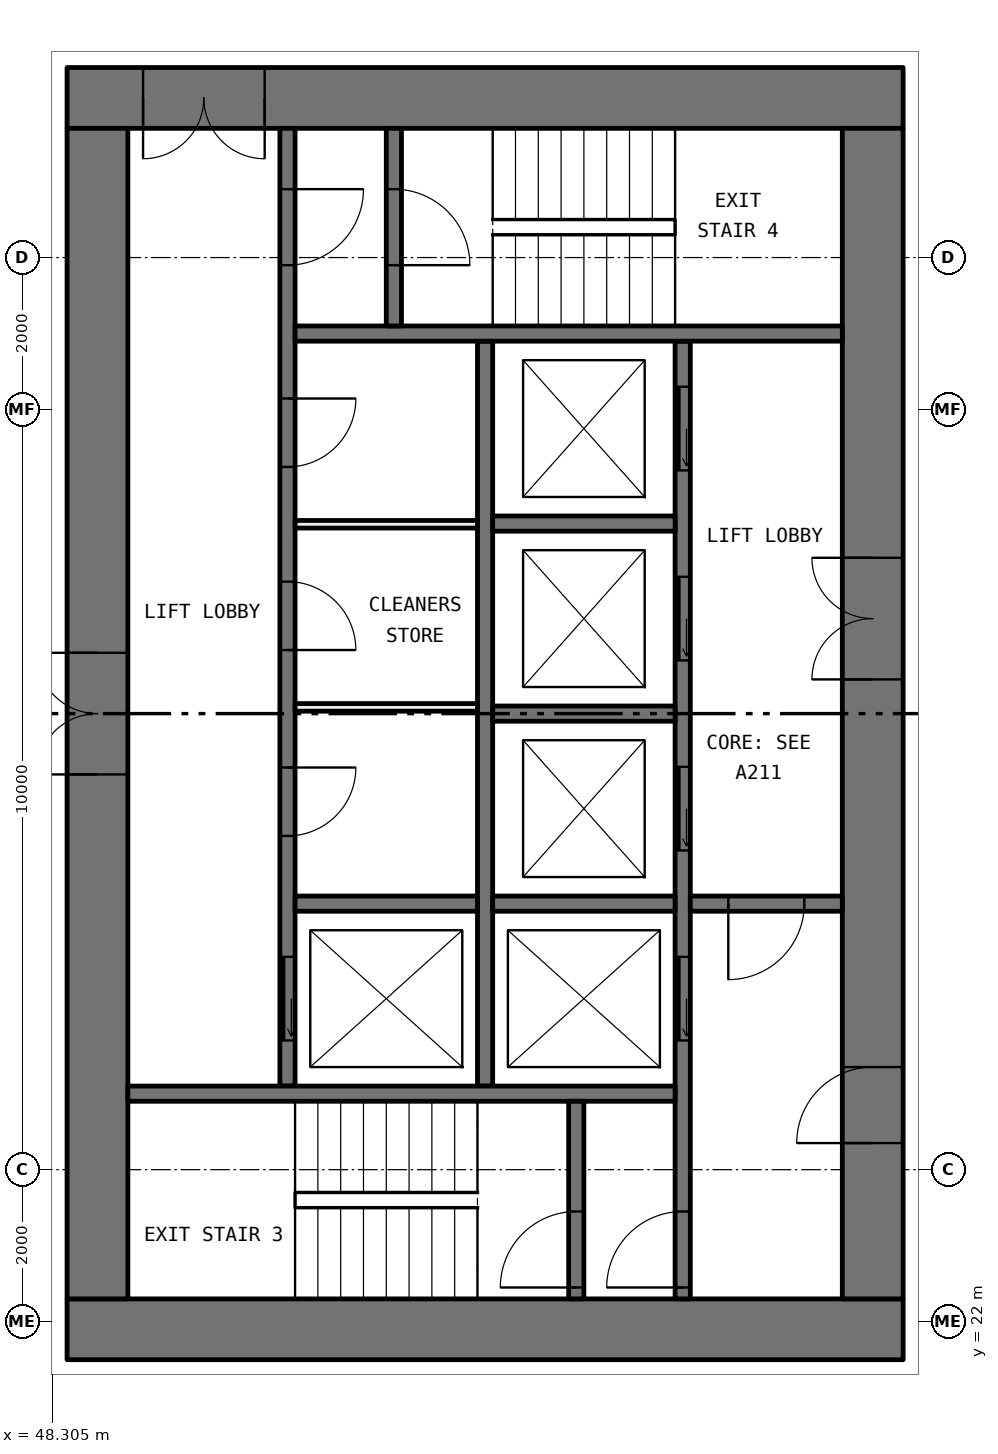
"""IFC4 building model, lengths in metres.
Left out: names, types, materials, properties, quantities, classifications, styles, units other than length and angle.
Written with IfcOpenShell. Run it as: python <this file> out.ifc"""

import sys

from ifc_helpers import new_model, si_unit, direction, frame, frame_2d, origin, place, context, subcontext, project, spatial, rectangle, extrude, element, fill, save


model = new_model("IFC4")
c1 = context("Model", 3, precision=1e-05, world=origin(), true_north=direction((0.0, 1.0)))
c2 = subcontext(c1, "Body", "Model", "MODEL_VIEW")
j1 = project(units=[si_unit("LENGTHUNIT", "METRE"), si_unit("PLANEANGLEUNIT", "RADIAN")], contexts=[c1])
p1 = place(None, origin())
s1 = spatial("IfcSite", under=j1, at=p1, CompositionType="ELEMENT")
p2 = place(p1, origin())
s2 = spatial("IfcBuilding", under=s1, at=p2, CompositionType="ELEMENT")
p3 = place(p2, frame((0.0, 0.0, 47.25)))
s3 = spatial("IfcBuildingStorey", under=s2, at=p3, CompositionType="ELEMENT", Elevation=47.25)
p4 = place(p3, frame((59.5, 21.9, 0.0), z_axis=(0.0, 0.0, 1.0), x_axis=(-1.0, 0.0, 0.0)))
e1 = element("IfcWall", 1, at=p4, inside=s3, PredefinedType="SHEAR", context=c2, shape_type="SweptSolid", body=[
    extrude(rectangle(XDim=11.0, YDim=0.8, at=frame_2d((5.5, 0.0))), origin(), (0.0, 0.0, 1.0), 3.05),
])
p5 = place(p3, frame((59.5, 38.1, 0.0), z_axis=(0.0, 0.0, 1.0), x_axis=(-1.0, 0.0, 0.0)))
e2 = element("IfcWall", 2, at=p5, inside=s3, PredefinedType="SHEAR", context=c2, shape_type="SweptSolid", body=[
    extrude(rectangle(XDim=11.0, YDim=0.8, at=frame_2d((5.5, 0.0))), origin(), (0.0, 0.0, 1.0), 3.05),
])
p6 = place(p5, frame((8.4, 0.0, 0.0)))
e3 = element("IfcOpeningElement", 3, at=p6, cuts=e2, PredefinedType="OPENING", context=c2, shape_type="SweptSolid", body=[
    extrude(rectangle(XDim=1.6, YDim=2.1, at=frame_2d((0.8, 1.05))), frame((0.0, 0.41, 0.0), z_axis=(0.0, -1.0, 0.0), x_axis=(1.0, 0.0, 0.0)), (0.0, 0.0, 1.0), 0.82),
])
p7 = place(p3, frame((59.1, 22.3, 0.0), z_axis=(0.0, 0.0, 1.0), x_axis=(0.0, 1.0, 0.0)))
e4 = element("IfcWall", 4, at=p7, inside=s3, PredefinedType="SHEAR", context=c2, shape_type="SweptSolid", body=[
    extrude(rectangle(XDim=15.4, YDim=0.8, at=frame_2d((7.7, 0.0))), origin(), (0.0, 0.0, 1.0), 3.05),
])
p8 = place(p7, frame((8.15, 0.0, 0.0)))
e5 = element("IfcOpeningElement", 5, at=p8, cuts=e4, PredefinedType="OPENING", context=c2, shape_type="SweptSolid", body=[
    extrude(rectangle(XDim=1.6, YDim=2.1, at=frame_2d((0.8, 1.05))), frame((0.0, 0.41, 0.0), z_axis=(0.0, -1.0, 0.0), x_axis=(1.0, 0.0, 0.0)), (0.0, 0.0, 1.0), 0.82),
])
p9 = place(p7, frame((2.05, 0.0, 0.0)))
e6 = element("IfcOpeningElement", 6, at=p9, cuts=e4, PredefinedType="OPENING", context=c2, shape_type="SweptSolid", body=[
    extrude(rectangle(XDim=1.0, YDim=2.1, at=frame_2d((0.5, 1.05))), frame((0.0, 0.41, 0.0), z_axis=(0.0, -1.0, 0.0), x_axis=(1.0, 0.0, 0.0)), (0.0, 0.0, 1.0), 0.82),
])
p10 = place(p3, frame((48.9, 22.3, 0.0), z_axis=(0.0, 0.0, 1.0), x_axis=(0.0, 1.0, 0.0)))
e7 = element("IfcWall", 7, at=p10, inside=s3, PredefinedType="SHEAR", context=c2, shape_type="SweptSolid", body=[
    extrude(rectangle(XDim=15.4, YDim=0.8, at=frame_2d((7.7, 0.0))), origin(), (0.0, 0.0, 1.0), 3.05),
])
p11 = place(p10, frame((6.9, 0.0, 0.0)))
e8 = element("IfcOpeningElement", 8, at=p11, cuts=e7, PredefinedType="OPENING", context=c2, shape_type="SweptSolid", body=[
    extrude(rectangle(XDim=1.6, YDim=2.1, at=frame_2d((0.8, 1.05))), frame((0.0, 0.41, 0.0), z_axis=(0.0, -1.0, 0.0), x_axis=(1.0, 0.0, 0.0)), (0.0, 0.0, 1.0), 0.82),
])
p12 = place(p3, frame((56.6, 22.3, 0.0), z_axis=(0.0, 0.0, 1.0), x_axis=(0.0, 1.0, 0.0)))
e9 = element("IfcWall", 9, at=p12, inside=s3, PredefinedType="SOLIDWALL", context=c2, shape_type="SweptSolid", body=[
    extrude(rectangle(XDim=12.6, YDim=0.2, at=frame_2d((6.3, 0.0))), origin(), (0.0, 0.0, 1.0), 3.05),
])
p13 = place(p12, frame((3.4, 0.0, 0.0)))
e10 = element("IfcOpeningElement", 10, at=p13, cuts=e9, PredefinedType="OPENING", context=c2, shape_type="SweptSolid", body=[
    extrude(rectangle(XDim=1.1, YDim=2.1, at=frame_2d((0.55, 1.05))), frame((0.0, 0.11, 0.0), z_axis=(0.0, -1.0, 0.0), x_axis=(1.0, 0.0, 0.0)), (0.0, 0.0, 1.0), 0.22),
])
p14 = place(p12, frame((5.9, 0.0, 0.0)))
e11 = element("IfcOpeningElement", 11, at=p14, cuts=e9, PredefinedType="OPENING", context=c2, shape_type="SweptSolid", body=[
    extrude(rectangle(XDim=1.1, YDim=2.1, at=frame_2d((0.55, 1.05))), frame((0.0, 0.11, 0.0), z_axis=(0.0, -1.0, 0.0), x_axis=(1.0, 0.0, 0.0)), (0.0, 0.0, 1.0), 0.22),
])
p15 = place(p12, frame((8.4, 0.0, 0.0)))
e12 = element("IfcOpeningElement", 12, at=p15, cuts=e9, PredefinedType="OPENING", context=c2, shape_type="SweptSolid", body=[
    extrude(rectangle(XDim=1.1, YDim=2.1, at=frame_2d((0.55, 1.05))), frame((0.0, 0.11, 0.0), z_axis=(0.0, -1.0, 0.0), x_axis=(1.0, 0.0, 0.0)), (0.0, 0.0, 1.0), 0.22),
])
p16 = place(p12, frame((10.9, 0.0, 0.0)))
e13 = element("IfcOpeningElement", 13, at=p16, cuts=e9, PredefinedType="OPENING", context=c2, shape_type="SweptSolid", body=[
    extrude(rectangle(XDim=1.1, YDim=2.1, at=frame_2d((0.55, 1.05))), frame((0.0, 0.11, 0.0), z_axis=(0.0, -1.0, 0.0), x_axis=(1.0, 0.0, 0.0)), (0.0, 0.0, 1.0), 0.22),
])
p17 = place(p12, frame((0.15, 0.0, 0.0)))
e14 = element("IfcOpeningElement", 14, at=p17, cuts=e9, PredefinedType="OPENING", context=c2, shape_type="SweptSolid", body=[
    extrude(rectangle(XDim=1.0, YDim=2.1, at=frame_2d((0.5, 1.05))), frame((0.0, 0.11, 0.0), z_axis=(0.0, -1.0, 0.0), x_axis=(1.0, 0.0, 0.0)), (0.0, 0.0, 1.0), 0.22),
])
p18 = place(p3, frame((51.4, 25.1, 0.0), z_axis=(0.0, 0.0, 1.0), x_axis=(0.0, 1.0, 0.0)))
e15 = element("IfcWall", 15, at=p18, inside=s3, PredefinedType="SOLIDWALL", context=c2, shape_type="SweptSolid", body=[
    extrude(rectangle(XDim=12.6, YDim=0.2, at=frame_2d((6.3, 0.0))), origin(), (0.0, 0.0, 1.0), 3.05),
])
p19 = place(p18, frame((0.6, 0.0, 0.0)))
e16 = element("IfcOpeningElement", 16, at=p19, cuts=e15, PredefinedType="OPENING", context=c2, shape_type="SweptSolid", body=[
    extrude(rectangle(XDim=1.1, YDim=2.1, at=frame_2d((0.55, 1.05))), frame((0.0, 0.11, 0.0), z_axis=(0.0, -1.0, 0.0), x_axis=(1.0, 0.0, 0.0)), (0.0, 0.0, 1.0), 0.22),
])
p20 = place(p18, frame((10.8, 0.0, 0.0)))
e17 = element("IfcOpeningElement", 17, at=p20, cuts=e15, PredefinedType="OPENING", context=c2, shape_type="SweptSolid", body=[
    extrude(rectangle(XDim=1.0, YDim=2.1, at=frame_2d((0.5, 1.05))), frame((0.0, 0.11, 0.0), z_axis=(0.0, -1.0, 0.0), x_axis=(1.0, 0.0, 0.0)), (0.0, 0.0, 1.0), 0.22),
])
p21 = place(p18, frame((3.291, 0.0, 0.0)))
e18 = element("IfcOpeningElement", 18, at=p21, cuts=e15, PredefinedType="OPENING", context=c2, shape_type="SweptSolid", body=[
    extrude(rectangle(XDim=0.9, YDim=2.1, at=frame_2d((0.45, 1.05))), frame((0.0, 0.11, 0.0), z_axis=(0.0, -1.0, 0.0), x_axis=(1.0, 0.0, 0.0)), (0.0, 0.0, 1.0), 0.22),
])
p22 = place(p18, frame((5.737, 0.0, 0.0)))
e19 = element("IfcOpeningElement", 19, at=p22, cuts=e15, PredefinedType="OPENING", context=c2, shape_type="SweptSolid", body=[
    extrude(rectangle(XDim=0.9, YDim=2.1, at=frame_2d((0.45, 1.05))), frame((0.0, 0.11, 0.0), z_axis=(0.0, -1.0, 0.0), x_axis=(1.0, 0.0, 0.0)), (0.0, 0.0, 1.0), 0.22),
])
p23 = place(p18, frame((8.146, 0.0, 0.0)))
e20 = element("IfcOpeningElement", 20, at=p23, cuts=e15, PredefinedType="OPENING", context=c2, shape_type="SweptSolid", body=[
    extrude(rectangle(XDim=0.9, YDim=2.1, at=frame_2d((0.45, 1.05))), frame((0.0, 0.11, 0.0), z_axis=(0.0, -1.0, 0.0), x_axis=(1.0, 0.0, 0.0)), (0.0, 0.0, 1.0), 0.22),
])
p24 = place(p3, frame((54.0, 25.1, 0.0), z_axis=(0.0, 0.0, 1.0), x_axis=(0.0, 1.0, 0.0)))
e21 = element("IfcWall", 21, at=p24, inside=s3, PredefinedType="SOLIDWALL", context=c2, shape_type="SweptSolid", body=[
    extrude(rectangle(XDim=9.8, YDim=0.2, at=frame_2d((4.9, 0.0))), origin(), (0.0, 0.0, 1.0), 3.05),
])
for number, where, z_axis, x_axis in (
    (22, (56.5, 25.0, 0.0), (0.0, 0.0, 1.0), (-1.0, 0.0, 0.0)),
    (23, (58.7, 35.0, 0.0), (0.0, 0.0, 1.0), (-1.0, 0.0, 0.0)),
):
    element("IfcWall", number, at=place(p3, frame(where, z_axis=z_axis, x_axis=x_axis)), inside=s3, PredefinedType="SOLIDWALL", context=c2, shape_type="SweptSolid", body=[
        extrude(rectangle(XDim=7.2, YDim=0.2, at=frame_2d((3.6, 0.0))), origin(), (0.0, 0.0, 1.0), 3.05),
    ])
p25 = place(p3, frame((58.7, 27.5, 0.0), z_axis=(0.0, 0.0, 1.0), x_axis=(-1.0, 0.0, 0.0)))
e24 = element("IfcWall", 24, at=p25, inside=s3, PredefinedType="SOLIDWALL", context=c2, shape_type="SweptSolid", body=[
    extrude(rectangle(XDim=2.0, YDim=0.2, at=frame_2d((1.0, 0.0))), origin(), (0.0, 0.0, 1.0), 3.05),
])
p26 = place(p25, frame((0.5, 0.0, 0.0)))
e25 = element("IfcOpeningElement", 25, at=p26, cuts=e24, PredefinedType="OPENING", context=c2, shape_type="SweptSolid", body=[
    extrude(rectangle(XDim=1.0, YDim=2.1, at=frame_2d((0.5, 1.05))), frame((0.0, 0.11, 0.0), z_axis=(0.0, -1.0, 0.0), x_axis=(1.0, 0.0, 0.0)), (0.0, 0.0, 1.0), 0.22),
])
p27 = place(p3, frame((55.2, 22.3, 0.0), z_axis=(0.0, 0.0, 1.0), x_axis=(0.0, 1.0, 0.0)))
e26 = element("IfcWall", 26, at=p27, inside=s3, PredefinedType="SOLIDWALL", context=c2, shape_type="SweptSolid", body=[
    extrude(rectangle(XDim=2.6, YDim=0.2, at=frame_2d((1.3, 0.0))), origin(), (0.0, 0.0, 1.0), 3.05),
])
p28 = place(p27, frame((0.15, 0.0, 0.0)))
e27 = element("IfcOpeningElement", 27, at=p28, cuts=e26, PredefinedType="OPENING", context=c2, shape_type="SweptSolid", body=[
    extrude(rectangle(XDim=1.0, YDim=2.1, at=frame_2d((0.5, 1.05))), frame((0.0, 0.11, 0.0), z_axis=(0.0, -1.0, 0.0), x_axis=(1.0, 0.0, 0.0)), (0.0, 0.0, 1.0), 0.22),
])
p29 = place(p3, frame((52.8, 35.1, 0.0), z_axis=(0.0, 0.0, 1.0), x_axis=(0.0, 1.0, 0.0)))
e28 = element("IfcWall", 28, at=p29, inside=s3, PredefinedType="SOLIDWALL", context=c2, shape_type="SweptSolid", body=[
    extrude(rectangle(XDim=2.6, YDim=0.2, at=frame_2d((1.3, 0.0))), origin(), (0.0, 0.0, 1.0), 3.05),
])
p30 = place(p29, frame((0.8, 0.0, 0.0)))
e29 = element("IfcOpeningElement", 29, at=p30, cuts=e28, PredefinedType="OPENING", context=c2, shape_type="SweptSolid", body=[
    extrude(rectangle(XDim=1.0, YDim=2.1, at=frame_2d((0.5, 1.05))), frame((0.0, 0.11, 0.0), z_axis=(0.0, -1.0, 0.0), x_axis=(1.0, 0.0, 0.0)), (0.0, 0.0, 1.0), 0.22),
])
for number, where, z_axis, x_axis in (
    (30, (56.5, 27.5, 0.0), (0.0, 0.0, 1.0), (-1.0, 0.0, 0.0)),
    (31, (56.5, 30.0, 0.0), (0.0, 0.0, 1.0), (-1.0, 0.0, 0.0)),
    (32, (56.5, 32.5, 0.0), (0.0, 0.0, 1.0), (-1.0, 0.0, 0.0)),
    (33, (53.9, 27.5, 0.0), (0.0, 0.0, 1.0), (-1.0, 0.0, 0.0)),
):
    element("IfcWall", number, at=place(p3, frame(where, z_axis=z_axis, x_axis=x_axis)), inside=s3, PredefinedType="SOLIDWALL", context=c2, shape_type="SweptSolid", body=[
        extrude(rectangle(XDim=2.4, YDim=0.2, at=frame_2d((1.2, 0.0))), origin(), (0.0, 0.0, 1.0), 3.05),
    ])
for number, where, z_axis, x_axis in (
    (34, (53.9, 30.082, 0.0), (0.0, 0.0, 1.0), (-1.0, 0.0, 0.0)),
    (35, (53.9, 32.491, 0.0), (0.0, 0.0, 1.0), (-1.0, 0.0, 0.0)),
):
    element("IfcWall", number, at=place(p3, frame(where, z_axis=z_axis, x_axis=x_axis)), inside=s3, PredefinedType="PARTITIONING", context=c2, shape_type="SweptSolid", body=[
        extrude(rectangle(XDim=2.4, YDim=0.1, at=frame_2d((1.2, 0.0))), origin(), (0.0, 0.0, 1.0), 3.05),
    ])
p31 = place(p19, origin())
e36 = element("IfcDoor", 36, at=p31, inside=s3, OperationType="SLIDING_TO_LEFT", PredefinedType="DOOR", context=c2, shape_type="SweptSolid", body=[
    extrude(rectangle(XDim=1.1, YDim=2.1, at=frame_2d((0.55, 1.05))), frame((0.0, 0.025, 0.0), z_axis=(0.0, -1.0, 0.0), x_axis=(1.0, 0.0, 0.0)), (0.0, 0.0, 1.0), 0.05),
])
fill(e16, e36)
p32 = place(p13, origin())
e37 = element("IfcDoor", 37, at=p32, inside=s3, OperationType="SLIDING_TO_LEFT", PredefinedType="DOOR", context=c2, shape_type="SweptSolid", body=[
    extrude(rectangle(XDim=1.1, YDim=2.1, at=frame_2d((0.55, 1.05))), frame((0.0, 0.025, 0.0), z_axis=(0.0, -1.0, 0.0), x_axis=(1.0, 0.0, 0.0)), (0.0, 0.0, 1.0), 0.05),
])
fill(e10, e37)
p33 = place(p14, origin())
e38 = element("IfcDoor", 38, at=p33, inside=s3, OperationType="SLIDING_TO_LEFT", PredefinedType="DOOR", context=c2, shape_type="SweptSolid", body=[
    extrude(rectangle(XDim=1.1, YDim=2.1, at=frame_2d((0.55, 1.05))), frame((0.0, 0.025, 0.0), z_axis=(0.0, -1.0, 0.0), x_axis=(1.0, 0.0, 0.0)), (0.0, 0.0, 1.0), 0.05),
])
fill(e11, e38)
p34 = place(p15, origin())
e39 = element("IfcDoor", 39, at=p34, inside=s3, OperationType="SLIDING_TO_LEFT", PredefinedType="DOOR", context=c2, shape_type="SweptSolid", body=[
    extrude(rectangle(XDim=1.1, YDim=2.1, at=frame_2d((0.55, 1.05))), frame((0.0, 0.025, 0.0), z_axis=(0.0, -1.0, 0.0), x_axis=(1.0, 0.0, 0.0)), (0.0, 0.0, 1.0), 0.05),
])
fill(e12, e39)
p35 = place(p16, origin())
e40 = element("IfcDoor", 40, at=p35, inside=s3, OperationType="SLIDING_TO_LEFT", PredefinedType="DOOR", context=c2, shape_type="SweptSolid", body=[
    extrude(rectangle(XDim=1.1, YDim=2.1, at=frame_2d((0.55, 1.05))), frame((0.0, 0.025, 0.0), z_axis=(0.0, -1.0, 0.0), x_axis=(1.0, 0.0, 0.0)), (0.0, 0.0, 1.0), 0.05),
])
fill(e13, e40)
p36 = place(p28, origin())
e41 = element("IfcDoor", 41, at=p36, inside=s3, OperationType="SINGLE_SWING_RIGHT", PredefinedType="DOOR", context=c2, shape_type="SweptSolid", body=[
    extrude(rectangle(XDim=1.0, YDim=2.1, at=frame_2d((0.5, 1.05))), frame((0.0, 0.025, 0.0), z_axis=(0.0, -1.0, 0.0), x_axis=(1.0, 0.0, 0.0)), (0.0, 0.0, 1.0), 0.05),
])
fill(e27, e41)
p37 = place(p17, origin())
e42 = element("IfcDoor", 42, at=p37, inside=s3, OperationType="SINGLE_SWING_RIGHT", PredefinedType="DOOR", context=c2, shape_type="SweptSolid", body=[
    extrude(rectangle(XDim=1.0, YDim=2.1, at=frame_2d((0.5, 1.05))), frame((0.0, 0.025, 0.0), z_axis=(0.0, -1.0, 0.0), x_axis=(1.0, 0.0, 0.0)), (0.0, 0.0, 1.0), 0.05),
])
fill(e14, e42)
p38 = place(p20, frame((1.0, 0.0, 0.0), x_axis=(-1.0, 0.0, 0.0)))
e43 = element("IfcDoor", 43, at=p38, inside=s3, OperationType="SINGLE_SWING_RIGHT", PredefinedType="DOOR", context=c2, shape_type="SweptSolid", body=[
    extrude(rectangle(XDim=1.0, YDim=2.1, at=frame_2d((0.5, 1.05))), frame((0.0, 0.025, 0.0), z_axis=(0.0, -1.0, 0.0), x_axis=(1.0, 0.0, 0.0)), (0.0, 0.0, 1.0), 0.05),
])
fill(e17, e43)
p39 = place(p30, frame((1.0, 0.0, 0.0), x_axis=(-1.0, 0.0, 0.0)))
e44 = element("IfcDoor", 44, at=p39, inside=s3, OperationType="SINGLE_SWING_LEFT", PredefinedType="DOOR", context=c2, shape_type="SweptSolid", body=[
    extrude(rectangle(XDim=1.0, YDim=2.1, at=frame_2d((0.5, 1.05))), frame((0.0, 0.025, 0.0), z_axis=(0.0, -1.0, 0.0), x_axis=(1.0, 0.0, 0.0)), (0.0, 0.0, 1.0), 0.05),
])
fill(e29, e44)
p40 = place(p26, origin())
e45 = element("IfcDoor", 45, at=p40, inside=s3, OperationType="SINGLE_SWING_LEFT", PredefinedType="DOOR", context=c2, shape_type="SweptSolid", body=[
    extrude(rectangle(XDim=1.0, YDim=2.1, at=frame_2d((0.5, 1.05))), frame((0.0, 0.025, 0.0), z_axis=(0.0, -1.0, 0.0), x_axis=(1.0, 0.0, 0.0)), (0.0, 0.0, 1.0), 0.05),
])
fill(e25, e45)
p41 = place(p8, origin())
e46 = element("IfcDoor", 46, at=p41, inside=s3, OperationType="DOUBLE_DOOR_SINGLE_SWING", PredefinedType="DOOR", context=c2, shape_type="SweptSolid", body=[
    extrude(rectangle(XDim=1.6, YDim=2.1, at=frame_2d((0.8, 1.05))), frame((0.0, 0.025, 0.0), z_axis=(0.0, -1.0, 0.0), x_axis=(1.0, 0.0, 0.0)), (0.0, 0.0, 1.0), 0.05),
])
fill(e5, e46)
p42 = place(p9, origin())
e47 = element("IfcDoor", 47, at=p42, inside=s3, OperationType="SINGLE_SWING_RIGHT", PredefinedType="DOOR", context=c2, shape_type="SweptSolid", body=[
    extrude(rectangle(XDim=1.0, YDim=2.1, at=frame_2d((0.5, 1.05))), frame((0.0, 0.025, 0.0), z_axis=(0.0, -1.0, 0.0), x_axis=(1.0, 0.0, 0.0)), (0.0, 0.0, 1.0), 0.05),
])
fill(e6, e47)
p43 = place(p6, origin())
e48 = element("IfcDoor", 48, at=p43, inside=s3, OperationType="DOUBLE_DOOR_SINGLE_SWING", PredefinedType="DOOR", context=c2, shape_type="SweptSolid", body=[
    extrude(rectangle(XDim=1.6, YDim=2.1, at=frame_2d((0.8, 1.05))), frame((0.0, 0.025, 0.0), z_axis=(0.0, -1.0, 0.0), x_axis=(1.0, 0.0, 0.0)), (0.0, 0.0, 1.0), 0.05),
])
fill(e3, e48)
p44 = place(p11, origin())
e49 = element("IfcDoor", 49, at=p44, inside=s3, OperationType="DOUBLE_DOOR_SINGLE_SWING", PredefinedType="DOOR", context=c2, shape_type="SweptSolid", body=[
    extrude(rectangle(XDim=1.6, YDim=2.1, at=frame_2d((0.8, 1.05))), frame((0.0, 0.025, 0.0), z_axis=(0.0, -1.0, 0.0), x_axis=(1.0, 0.0, 0.0)), (0.0, 0.0, 1.0), 0.05),
])
fill(e8, e49)
p45 = place(p21, frame((0.9, 0.0, 0.0), x_axis=(-1.0, 0.0, 0.0)))
e50 = element("IfcDoor", 50, at=p45, inside=s3, OperationType="SINGLE_SWING_RIGHT", PredefinedType="DOOR", context=c2, shape_type="SweptSolid", body=[
    extrude(rectangle(XDim=0.9, YDim=2.1, at=frame_2d((0.45, 1.05))), frame((0.0, 0.025, 0.0), z_axis=(0.0, -1.0, 0.0), x_axis=(1.0, 0.0, 0.0)), (0.0, 0.0, 1.0), 0.05),
])
fill(e18, e50)
p46 = place(p22, frame((0.9, 0.0, 0.0), x_axis=(-1.0, 0.0, 0.0)))
e51 = element("IfcDoor", 51, at=p46, inside=s3, OperationType="SINGLE_SWING_LEFT", PredefinedType="DOOR", context=c2, shape_type="SweptSolid", body=[
    extrude(rectangle(XDim=0.9, YDim=2.1, at=frame_2d((0.45, 1.05))), frame((0.0, 0.025, 0.0), z_axis=(0.0, -1.0, 0.0), x_axis=(1.0, 0.0, 0.0)), (0.0, 0.0, 1.0), 0.05),
])
fill(e19, e51)
p47 = place(p23, frame((0.9, 0.0, 0.0), x_axis=(-1.0, 0.0, 0.0)))
e52 = element("IfcDoor", 52, at=p47, inside=s3, OperationType="SINGLE_SWING_RIGHT", PredefinedType="DOOR", context=c2, shape_type="SweptSolid", body=[
    extrude(rectangle(XDim=0.9, YDim=2.1, at=frame_2d((0.45, 1.05))), frame((0.0, 0.025, 0.0), z_axis=(0.0, -1.0, 0.0), x_axis=(1.0, 0.0, 0.0)), (0.0, 0.0, 1.0), 0.05),
])
fill(e20, e52)
save(model, sys.argv[1])
